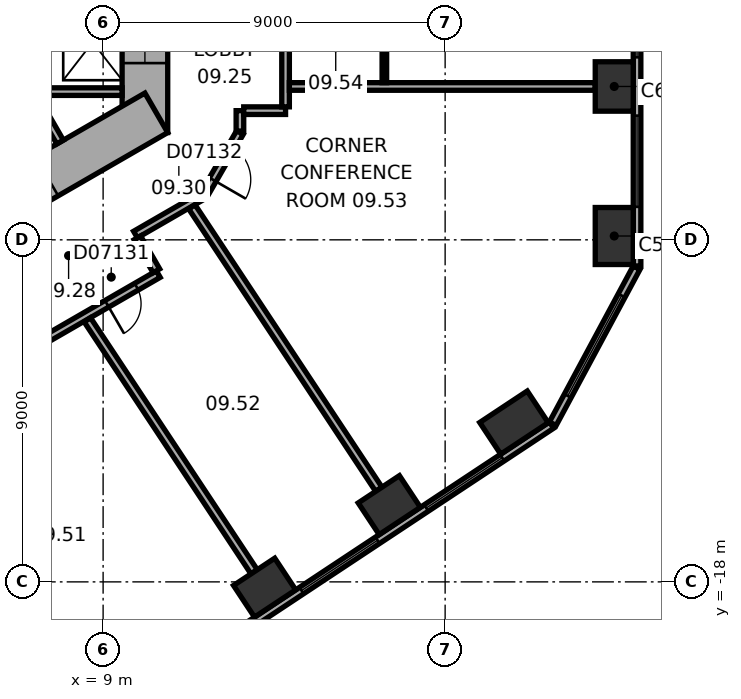
"""IFC4 building model, lengths in metres.
Left out: names, types, materials, properties, quantities, classifications, styles, units other than length and angle.
Written with IfcOpenShell. Run it as: python <this file> out.ifc"""

import sys

from ifc_helpers import new_model, si_unit, direction, frame, frame_2d, origin, origin_2d, place, context, subcontext, project, spatial, rectangle, extrude, element, fill, save


model = new_model("IFC4")
c1 = context("Model", 3, precision=1e-05, world=origin(), true_north=direction((0.0, 1.0)))
c2 = subcontext(c1, "Body", "Model", "MODEL_VIEW")
j1 = project(units=[si_unit("LENGTHUNIT", "METRE"), si_unit("PLANEANGLEUNIT", "RADIAN")], contexts=[c1])
p1 = place(None, origin())
s1 = spatial("IfcSite", under=j1, at=p1, CompositionType="ELEMENT")
p2 = place(p1, origin())
s2 = spatial("IfcBuilding", under=s1, at=p2, CompositionType="ELEMENT")
p3 = place(p2, frame((0.0, 0.0, 50.6)))
s3 = spatial("IfcBuildingStorey", under=s2, at=p3, CompositionType="ELEMENT", Elevation=50.6)
p4 = place(p3, frame((22.45, -8.899, 0.0), z_axis=(0.0, 0.0, 1.0), x_axis=(0.0, 1.0, 0.0)))
e1 = element("IfcColumn", 1, at=p4, inside=s3, PredefinedType="COLUMN", context=c2, shape_type="SweptSolid", body=[
    extrude(rectangle(XDim=1.5, YDim=1.0, at=origin_2d()), origin(), (0.0, 0.0, 1.0), 3.3),
])
for number, where, z_axis, x_axis in (
    (2, (22.45, -4.965, 0.0), (0.0, 0.0, 1.0), (0.0, 1.0, 0.0)),
    (3, (13.25, -18.152, 0.0), (0.0, 0.0, 1.0), (0.834, 0.552, 0.0)),
    (4, (16.531, -15.981, 0.0), (0.0, 0.0, 1.0), (0.834, 0.552, 0.0)),
):
    element("IfcColumn", number, at=place(p3, frame(where, z_axis=z_axis, x_axis=x_axis)), inside=s3, PredefinedType="COLUMN", context=c2, shape_type="SweptSolid", body=[
        extrude(rectangle(XDim=1.3, YDim=1.0, at=origin_2d()), origin(), (0.0, 0.0, 1.0), 3.3),
    ])
p5 = place(p3, frame((19.812, -13.809, 0.0), z_axis=(0.0, 0.0, 1.0), x_axis=(0.833885822067, 0.551936985312, 0.0)))
e5 = element("IfcColumn", 5, at=p5, inside=s3, PredefinedType="COLUMN", context=c2, shape_type="SweptSolid", body=[
    extrude(rectangle(XDim=1.5, YDim=1.0, at=origin_2d()), origin(), (0.0, 0.0, 1.0), 3.3),
])
p6 = place(p3, frame((10.1, -6.177, 0.0), z_axis=(0.0, 0.0, 1.0), x_axis=(0.0, 1.0, 0.0)))
e6 = element("IfcWall", 6, at=p6, inside=s3, PredefinedType="SHEAR", context=c2, shape_type="SweptSolid", body=[
    extrude(rectangle(XDim=12.355, YDim=1.2, at=frame_2d((6.177, 0.0))), origin(), (0.0, 0.0, 1.0), 3.3),
])
p7 = place(p6, frame((6.378, 0.0, 0.0)))
e7 = element("IfcOpeningElement", 7, at=p7, cuts=e6, PredefinedType="OPENING", context=c2, shape_type="SweptSolid", body=[
    extrude(rectangle(XDim=1.5, YDim=2.1, at=frame_2d((0.75, 1.05))), frame((0.0, 0.61, 0.0), z_axis=(0.0, -1.0, 0.0), x_axis=(1.0, 0.0, 0.0)), (0.0, 0.0, 1.0), 1.22),
])
p8 = place(p6, frame((1.828, 0.0, 0.0)))
e8 = element("IfcOpeningElement", 8, at=p8, cuts=e6, PredefinedType="OPENING", context=c2, shape_type="SweptSolid", body=[
    extrude(rectangle(XDim=1.1, YDim=2.1, at=frame_2d((0.55, 1.05))), frame((0.0, 0.61, 0.0), z_axis=(0.0, -1.0, 0.0), x_axis=(1.0, 0.0, 0.0)), (0.0, 0.0, 1.0), 1.22),
])
p9 = place(p6, frame((4.427, 0.0, 0.0)))
e9 = element("IfcOpeningElement", 9, at=p9, cuts=e6, PredefinedType="OPENING", context=c2, shape_type="SweptSolid", body=[
    extrude(rectangle(XDim=1.1, YDim=2.1, at=frame_2d((0.55, 1.05))), frame((0.0, 0.61, 0.0), z_axis=(0.0, -1.0, 0.0), x_axis=(1.0, 0.0, 0.0)), (0.0, 0.0, 1.0), 1.22),
])
p10 = place(p3, frame((-0.3, -11.836, 0.0), z_axis=(0.0, 0.0, 1.0), x_axis=(0.866021384402, 0.500006961711, 0.0)))
e10 = element("IfcWall", 10, at=p10, inside=s3, PredefinedType="SHEAR", context=c2, shape_type="SweptSolid", body=[
    extrude(rectangle(XDim=12.355, YDim=1.2, at=frame_2d((6.178, 0.0))), origin(), (0.0, 0.0, 1.0), 3.3),
])
p11 = place(p10, frame((2.828, 0.0, 0.0)))
e11 = element("IfcOpeningElement", 11, at=p11, cuts=e10, PredefinedType="OPENING", context=c2, shape_type="SweptSolid", body=[
    extrude(rectangle(XDim=0.9, YDim=2.1, at=frame_2d((0.45, 1.05))), frame((0.0, 0.61, 0.0), z_axis=(0.0, -1.0, 0.0), x_axis=(1.0, 0.0, 0.0)), (0.0, 0.0, 1.0), 1.22),
])
p12 = place(p10, frame((5.428, 0.0, 0.0)))
e12 = element("IfcOpeningElement", 12, at=p12, cuts=e10, PredefinedType="OPENING", context=c2, shape_type="SweptSolid", body=[
    extrude(rectangle(XDim=0.9, YDim=2.1, at=frame_2d((0.45, 1.05))), frame((0.0, 0.61, 0.0), z_axis=(0.0, -1.0, 0.0), x_axis=(1.0, 0.0, 0.0)), (0.0, 0.0, 1.0), 1.22),
])
p13 = place(p10, frame((7.928, 0.0, 0.0)))
e13 = element("IfcOpeningElement", 13, at=p13, cuts=e10, PredefinedType="OPENING", context=c2, shape_type="SweptSolid", body=[
    extrude(rectangle(XDim=1.1, YDim=2.1, at=frame_2d((0.55, 1.05))), frame((0.0, 0.61, 0.0), z_axis=(0.0, -1.0, 0.0), x_axis=(1.0, 0.0, 0.0)), (0.0, 0.0, 1.0), 1.22),
])
p14 = place(p3, frame((23.05, -9.687, 0.0), z_axis=(0.0, 0.0, 1.0), x_axis=(0.0, 1.0, 0.0)))
e14 = element("IfcWall", 14, at=p14, inside=s3, PredefinedType="STANDARD", context=c2, shape_type="SweptSolid", body=[
    extrude(rectangle(XDim=21.246, YDim=0.2, at=frame_2d((10.623, 0.0))), origin(), (0.0, 0.0, 1.0), 3.3),
])
p15 = place(p14, frame((1.555, 0.0, 0.8)))
e15 = element("IfcOpeningElement", 15, at=p15, cuts=e14, PredefinedType="OPENING", context=c2, shape_type="SweptSolid", body=[
    extrude(rectangle(XDim=2.4, YDim=1.7, at=frame_2d((1.2, 0.85))), frame((0.0, 0.11, 0.0), z_axis=(0.0, -1.0, 0.0), x_axis=(1.0, 0.0, 0.0)), (0.0, 0.0, 1.0), 0.22),
])
p16 = place(p14, frame((5.489, 0.0, 0.8)))
e16 = element("IfcOpeningElement", 16, at=p16, cuts=e14, PredefinedType="OPENING", context=c2, shape_type="SweptSolid", body=[
    extrude(rectangle(XDim=2.4, YDim=1.7, at=frame_2d((1.2, 0.85))), frame((0.0, 0.11, 0.0), z_axis=(0.0, -1.0, 0.0), x_axis=(1.0, 0.0, 0.0)), (0.0, 0.0, 1.0), 0.22),
])
p17 = place(p14, frame((9.424, 0.0, 0.8)))
e17 = element("IfcOpeningElement", 17, at=p17, cuts=e14, PredefinedType="OPENING", context=c2, shape_type="SweptSolid", body=[
    extrude(rectangle(XDim=2.4, YDim=1.7, at=frame_2d((1.2, 0.85))), frame((0.0, 0.11, 0.0), z_axis=(0.0, -1.0, 0.0), x_axis=(1.0, 0.0, 0.0)), (0.0, 0.0, 1.0), 0.22),
])
p18 = place(p14, frame((13.358, 0.0, 0.8)))
e18 = element("IfcOpeningElement", 18, at=p18, cuts=e14, PredefinedType="OPENING", context=c2, shape_type="SweptSolid", body=[
    extrude(rectangle(XDim=2.4, YDim=1.7, at=frame_2d((1.2, 0.85))), frame((0.0, 0.11, 0.0), z_axis=(0.0, -1.0, 0.0), x_axis=(1.0, 0.0, 0.0)), (0.0, 0.0, 1.0), 0.22),
])
p19 = place(p14, frame((17.293, 0.0, 0.8)))
e19 = element("IfcOpeningElement", 19, at=p19, cuts=e14, PredefinedType="OPENING", context=c2, shape_type="SweptSolid", body=[
    extrude(rectangle(XDim=2.4, YDim=1.7, at=frame_2d((1.2, 0.85))), frame((0.0, 0.11, 0.0), z_axis=(0.0, -1.0, 0.0), x_axis=(1.0, 0.0, 0.0)), (0.0, 0.0, 1.0), 0.22),
])
p20 = place(p3, frame((3.083, -25.601, 0.0), z_axis=(0.0, 0.0, 1.0), x_axis=(0.833884295743, 0.551939291329, 0.0)))
e20 = element("IfcWall", 20, at=p20, inside=s3, PredefinedType="STANDARD", context=c2, shape_type="SweptSolid", body=[
    extrude(rectangle(XDim=21.246, YDim=0.2, at=frame_2d((10.623, 0.0))), origin(), (0.0, 0.0, 1.0), 3.3),
])
p21 = place(p20, frame((1.553, 0.0, 0.8)))
e21 = element("IfcOpeningElement", 21, at=p21, cuts=e20, PredefinedType="OPENING", context=c2, shape_type="SweptSolid", body=[
    extrude(rectangle(XDim=2.4, YDim=1.7, at=frame_2d((1.2, 0.85))), frame((0.0, 0.11, 0.0), z_axis=(0.0, -1.0, 0.0), x_axis=(1.0, 0.0, 0.0)), (0.0, 0.0, 1.0), 0.22),
])
p22 = place(p20, frame((5.488, 0.0, 0.8)))
e22 = element("IfcOpeningElement", 22, at=p22, cuts=e20, PredefinedType="OPENING", context=c2, shape_type="SweptSolid", body=[
    extrude(rectangle(XDim=2.4, YDim=1.7, at=frame_2d((1.2, 0.85))), frame((0.0, 0.11, 0.0), z_axis=(0.0, -1.0, 0.0), x_axis=(1.0, 0.0, 0.0)), (0.0, 0.0, 1.0), 0.22),
])
p23 = place(p20, frame((9.422, 0.0, 0.8)))
e23 = element("IfcOpeningElement", 23, at=p23, cuts=e20, PredefinedType="OPENING", context=c2, shape_type="SweptSolid", body=[
    extrude(rectangle(XDim=2.4, YDim=1.7, at=frame_2d((1.2, 0.85))), frame((0.0, 0.11, 0.0), z_axis=(0.0, -1.0, 0.0), x_axis=(1.0, 0.0, 0.0)), (0.0, 0.0, 1.0), 0.22),
])
p24 = place(p20, frame((13.357, 0.0, 0.8)))
e24 = element("IfcOpeningElement", 24, at=p24, cuts=e20, PredefinedType="OPENING", context=c2, shape_type="SweptSolid", body=[
    extrude(rectangle(XDim=2.4, YDim=1.7, at=frame_2d((1.2, 0.85))), frame((0.0, 0.11, 0.0), z_axis=(0.0, -1.0, 0.0), x_axis=(1.0, 0.0, 0.0)), (0.0, 0.0, 1.0), 0.22),
])
p25 = place(p20, frame((17.291, 0.0, 0.8)))
e25 = element("IfcOpeningElement", 25, at=p25, cuts=e20, PredefinedType="OPENING", context=c2, shape_type="SweptSolid", body=[
    extrude(rectangle(XDim=2.4, YDim=1.7, at=frame_2d((1.2, 0.85))), frame((0.0, 0.11, 0.0), z_axis=(0.0, -1.0, 0.0), x_axis=(1.0, 0.0, 0.0)), (0.0, 0.0, 1.0), 0.22),
])
p26 = place(p3, frame((20.833, -13.839, 0.0), z_axis=(0.0, 0.0, 1.0), x_axis=(0.473321668581, 0.880889662813, 0.0)))
e26 = element("IfcWall", 26, at=p26, inside=s3, PredefinedType="STANDARD", context=c2, shape_type="SweptSolid", body=[
    extrude(rectangle(XDim=4.66, YDim=0.2, at=frame_2d((2.33, 0.0))), origin(), (0.0, 0.0, 1.0), 3.3),
])
p27 = place(p26, frame((0.83, 0.0, 0.8)))
e27 = element("IfcOpeningElement", 27, at=p27, cuts=e26, PredefinedType="OPENING", context=c2, shape_type="SweptSolid", body=[
    extrude(rectangle(XDim=3.0, YDim=1.7, at=frame_2d((1.5, 0.85))), frame((0.0, 0.11, 0.0), z_axis=(0.0, -1.0, 0.0), x_axis=(1.0, 0.0, 0.0)), (0.0, 0.0, 1.0), 0.22),
])
for number, where, z_axis, x_axis in (
    (28, (7.3, -5.1, 0.0), (0.0, 0.0, 1.0), (1.0, 0.0, 0.0)),
    (29, (6.768, -4.522, 0.0), (0.0, 0.0, 1.0), (0.5, -0.866, 0.0)),
):
    element("IfcWall", number, at=place(p3, frame(where, z_axis=z_axis, x_axis=x_axis)), inside=s3, PredefinedType="PARTITIONING", context=c2, shape_type="SweptSolid", body=[
        extrude(rectangle(XDim=2.2, YDim=0.2, at=frame_2d((1.1, 0.0))), origin(), (0.0, 0.0, 1.0), 3.05),
    ])
p28 = place(p3, frame((7.419, -11.653, 0.0), z_axis=(0.0, 0.0, 1.0), x_axis=(0.866038154057, 0.49997791523, 0.0)))
e30 = element("IfcWall", 30, at=p28, inside=s3, PredefinedType="PARTITIONING", context=c2, shape_type="SweptSolid", body=[
    extrude(rectangle(XDim=3.502, YDim=0.2, at=frame_2d((1.751, 0.0))), origin(), (0.0, 0.0, 1.0), 3.05),
])
p29 = place(p28, frame((1.94, 0.0, 0.0)))
e31 = element("IfcOpeningElement", 31, at=p29, cuts=e30, PredefinedType="OPENING", context=c2, shape_type="SweptSolid", body=[
    extrude(rectangle(XDim=0.9, YDim=2.1, at=frame_2d((0.45, 1.05))), frame((0.0, 0.11, 0.0), z_axis=(0.0, -1.0, 0.0), x_axis=(1.0, 0.0, 0.0)), (0.0, 0.0, 1.0), 0.22),
])
p30 = place(p3, frame((9.852, -8.861, 0.0), z_axis=(0.0, 0.0, 1.0), x_axis=(0.866013291437, 0.500020978615, 0.0)))
e32 = element("IfcWall", 32, at=p30, inside=s3, PredefinedType="PARTITIONING", context=c2, shape_type="SweptSolid", body=[
    extrude(rectangle(XDim=2.077, YDim=0.2, at=frame_2d((1.038, 0.0))), origin(), (0.0, 0.0, 1.0), 3.05),
])
p31 = place(p3, frame((10.402, -9.815, 0.0), z_axis=(0.0, 0.0, 1.0), x_axis=(-0.499968756647, 0.866043441391, 0.0)))
e33 = element("IfcWall", 33, at=p31, inside=s3, PredefinedType="PARTITIONING", context=c2, shape_type="SweptSolid", body=[
    extrude(rectangle(XDim=1.001, YDim=0.2, at=frame_2d((0.5, 0.0))), origin(), (0.0, 0.0, 1.0), 3.05),
])
p32 = place(p3, frame((11.67, -7.788, 0.0), z_axis=(0.0, 0.0, 1.0), x_axis=(0.500063286585, 0.865988862174, 0.0)))
e34 = element("IfcWall", 34, at=p32, inside=s3, PredefinedType="PARTITIONING", context=c2, shape_type="SweptSolid", body=[
    extrude(rectangle(XDim=1.86, YDim=0.2, at=frame_2d((0.93, 0.0))), origin(), (0.0, 0.0, 1.0), 3.05),
])
p33 = place(p32, frame((0.43, 0.0, 0.0)))
e35 = element("IfcOpeningElement", 35, at=p33, cuts=e34, PredefinedType="OPENING", context=c2, shape_type="SweptSolid", body=[
    extrude(rectangle(XDim=1.0, YDim=2.1, at=frame_2d((0.5, 1.05))), frame((0.0, 0.11, 0.0), z_axis=(0.0, -1.0, 0.0), x_axis=(1.0, 0.0, 0.0)), (0.0, 0.0, 1.0), 0.22),
])
p34 = place(p3, frame((12.6, -6.138, 0.0), z_axis=(0.0, 0.0, 1.0), x_axis=(0.0, 1.0, 0.0)))
e36 = element("IfcWall", 36, at=p34, inside=s3, PredefinedType="PARTITIONING", context=c2, shape_type="SweptSolid", body=[
    extrude(rectangle(XDim=0.537, YDim=0.2, at=frame_2d((0.268, 0.0))), origin(), (0.0, 0.0, 1.0), 3.05),
])
p35 = place(p3, frame((12.7, -5.601, 0.0), z_axis=(0.0, 0.0, 1.0), x_axis=(1.0, 0.0, 0.0)))
e37 = element("IfcWall", 37, at=p35, inside=s3, PredefinedType="PARTITIONING", context=c2, shape_type="SweptSolid", body=[
    extrude(rectangle(XDim=1.101, YDim=0.2, at=frame_2d((0.551, 0.0))), origin(), (0.0, 0.0, 1.0), 3.05),
])
p36 = place(p3, frame((12.974, -17.735, 0.0), z_axis=(0.0, 0.0, 1.0), x_axis=(-0.55192625685, 0.833892922982, 0.0)))
e38 = element("IfcWall", 38, at=p36, inside=s3, PredefinedType="PARTITIONING", context=c2, shape_type="SweptSolid", body=[
    extrude(rectangle(XDim=7.95, YDim=0.2, at=frame_2d((3.975, 0.0))), origin(), (0.0, 0.0, 1.0), 3.05),
])
p37 = place(p3, frame((13.801, -5.501, 0.0), z_axis=(0.0, 0.0, 1.0), x_axis=(0.0, 1.0, 0.0)))
e39 = element("IfcWall", 39, at=p37, inside=s3, PredefinedType="PARTITIONING", context=c2, shape_type="SweptSolid", body=[
    extrude(rectangle(XDim=5.702, YDim=0.2, at=frame_2d((2.851, 0.0))), origin(), (0.0, 0.0, 1.0), 3.05),
])
p38 = place(p37, frame((3.079, 0.0, 0.0)))
e40 = element("IfcOpeningElement", 40, at=p38, cuts=e39, PredefinedType="OPENING", context=c2, shape_type="SweptSolid", body=[
    extrude(rectangle(XDim=0.9, YDim=2.1, at=frame_2d((0.45, 1.05))), frame((0.0, 0.11, 0.0), z_axis=(0.0, -1.0, 0.0), x_axis=(1.0, 0.0, 0.0)), (0.0, 0.0, 1.0), 0.22),
])
p39 = place(p37, frame((4.636, 0.0, 0.0)))
e41 = element("IfcOpeningElement", 41, at=p39, cuts=e39, PredefinedType="OPENING", context=c2, shape_type="SweptSolid", body=[
    extrude(rectangle(XDim=0.9, YDim=2.1, at=frame_2d((0.45, 1.05))), frame((0.0, 0.11, 0.0), z_axis=(0.0, -1.0, 0.0), x_axis=(1.0, 0.0, 0.0)), (0.0, 0.0, 1.0), 0.22),
])
p40 = place(p3, frame((13.901, -4.965, 0.0), z_axis=(0.0, 0.0, 1.0), x_axis=(1.0, 0.0, 0.0)))
e42 = element("IfcWall", 42, at=p40, inside=s3, PredefinedType="PARTITIONING", context=c2, shape_type="SweptSolid", body=[
    extrude(rectangle(XDim=8.049, YDim=0.2, at=frame_2d((4.024, 0.0))), origin(), (0.0, 0.0, 1.0), 3.05),
])
p41 = place(p3, frame((16.255, -15.564, 0.0), z_axis=(0.0, 0.0, 1.0), x_axis=(-0.55192208744, 0.833895682562, 0.0)))
e43 = element("IfcWall", 43, at=p41, inside=s3, PredefinedType="PARTITIONING", context=c2, shape_type="SweptSolid", body=[
    extrude(rectangle(XDim=8.913, YDim=0.2, at=frame_2d((4.457, 0.0))), origin(), (0.0, 0.0, 1.0), 2.6),
])
p42 = place(p3, frame((16.401, -3.025, 0.0), z_axis=(0.0, 0.0, 1.0), x_axis=(0.0, -1.0, 0.0)))
e44 = element("IfcWall", 44, at=p42, inside=s3, PredefinedType="PARTITIONING", context=c2, shape_type="SweptSolid", body=[
    extrude(rectangle(XDim=1.84, YDim=0.12, at=frame_2d((0.92, 0.0))), origin(), (0.0, 0.0, 1.0), 3.05),
])
p43 = place(p15, origin())
e45 = element("IfcWindow", 45, at=p43, inside=s3, PartitioningType="SINGLE_PANEL", PredefinedType="WINDOW", context=c2, shape_type="SweptSolid", body=[
    extrude(rectangle(XDim=2.4, YDim=1.7, at=frame_2d((1.2, 0.85))), frame((0.0, 0.03, 0.0), z_axis=(0.0, -1.0, 0.0), x_axis=(1.0, 0.0, 0.0)), (0.0, 0.0, 1.0), 0.06),
])
fill(e15, e45)
p44 = place(p16, origin())
e46 = element("IfcWindow", 46, at=p44, inside=s3, PartitioningType="SINGLE_PANEL", PredefinedType="WINDOW", context=c2, shape_type="SweptSolid", body=[
    extrude(rectangle(XDim=2.4, YDim=1.7, at=frame_2d((1.2, 0.85))), frame((0.0, 0.03, 0.0), z_axis=(0.0, -1.0, 0.0), x_axis=(1.0, 0.0, 0.0)), (0.0, 0.0, 1.0), 0.06),
])
fill(e16, e46)
p45 = place(p24, origin())
e47 = element("IfcWindow", 47, at=p45, inside=s3, PartitioningType="SINGLE_PANEL", PredefinedType="WINDOW", context=c2, shape_type="SweptSolid", body=[
    extrude(rectangle(XDim=2.4, YDim=1.7, at=frame_2d((1.2, 0.85))), frame((0.0, 0.03, 0.0), z_axis=(0.0, -1.0, 0.0), x_axis=(1.0, 0.0, 0.0)), (0.0, 0.0, 1.0), 0.06),
])
fill(e24, e47)
p46 = place(p25, origin())
e48 = element("IfcWindow", 48, at=p46, inside=s3, PartitioningType="SINGLE_PANEL", PredefinedType="WINDOW", context=c2, shape_type="SweptSolid", body=[
    extrude(rectangle(XDim=2.4, YDim=1.7, at=frame_2d((1.2, 0.85))), frame((0.0, 0.03, 0.0), z_axis=(0.0, -1.0, 0.0), x_axis=(1.0, 0.0, 0.0)), (0.0, 0.0, 1.0), 0.06),
])
fill(e25, e48)
p47 = place(p27, origin())
e49 = element("IfcWindow", 49, at=p47, inside=s3, PartitioningType="SINGLE_PANEL", PredefinedType="WINDOW", context=c2, shape_type="SweptSolid", body=[
    extrude(rectangle(XDim=3.0, YDim=1.7, at=frame_2d((1.5, 0.85))), frame((0.0, 0.03, 0.0), z_axis=(0.0, -1.0, 0.0), x_axis=(1.0, 0.0, 0.0)), (0.0, 0.0, 1.0), 0.06),
])
fill(e27, e49)
p48 = place(p8, origin())
e50 = element("IfcDoor", 50, at=p48, inside=s3, OperationType="DOUBLE_DOOR_SLIDING", PredefinedType="DOOR", context=c2, shape_type="SweptSolid", body=[
    extrude(rectangle(XDim=1.1, YDim=2.1, at=frame_2d((0.55, 1.05))), frame((0.0, 0.025, 0.0), z_axis=(0.0, -1.0, 0.0), x_axis=(1.0, 0.0, 0.0)), (0.0, 0.0, 1.0), 0.05),
])
fill(e8, e50)
p49 = place(p29, origin())
e51 = element("IfcDoor", 51, at=p49, inside=s3, OperationType="SINGLE_SWING_LEFT", PredefinedType="DOOR", context=c2, shape_type="SweptSolid", body=[
    extrude(rectangle(XDim=0.9, YDim=2.1, at=frame_2d((0.45, 1.05))), frame((0.0, 0.025, 0.0), z_axis=(0.0, -1.0, 0.0), x_axis=(1.0, 0.0, 0.0)), (0.0, 0.0, 1.0), 0.05),
])
fill(e31, e51)
p50 = place(p33, origin())
e52 = element("IfcDoor", 52, at=p50, inside=s3, OperationType="SINGLE_SWING_LEFT", PredefinedType="DOOR", context=c2, shape_type="SweptSolid", body=[
    extrude(rectangle(XDim=1.0, YDim=2.1, at=frame_2d((0.5, 1.05))), frame((0.0, 0.025, 0.0), z_axis=(0.0, -1.0, 0.0), x_axis=(1.0, 0.0, 0.0)), (0.0, 0.0, 1.0), 0.05),
])
fill(e35, e52)
save(model, sys.argv[1])
